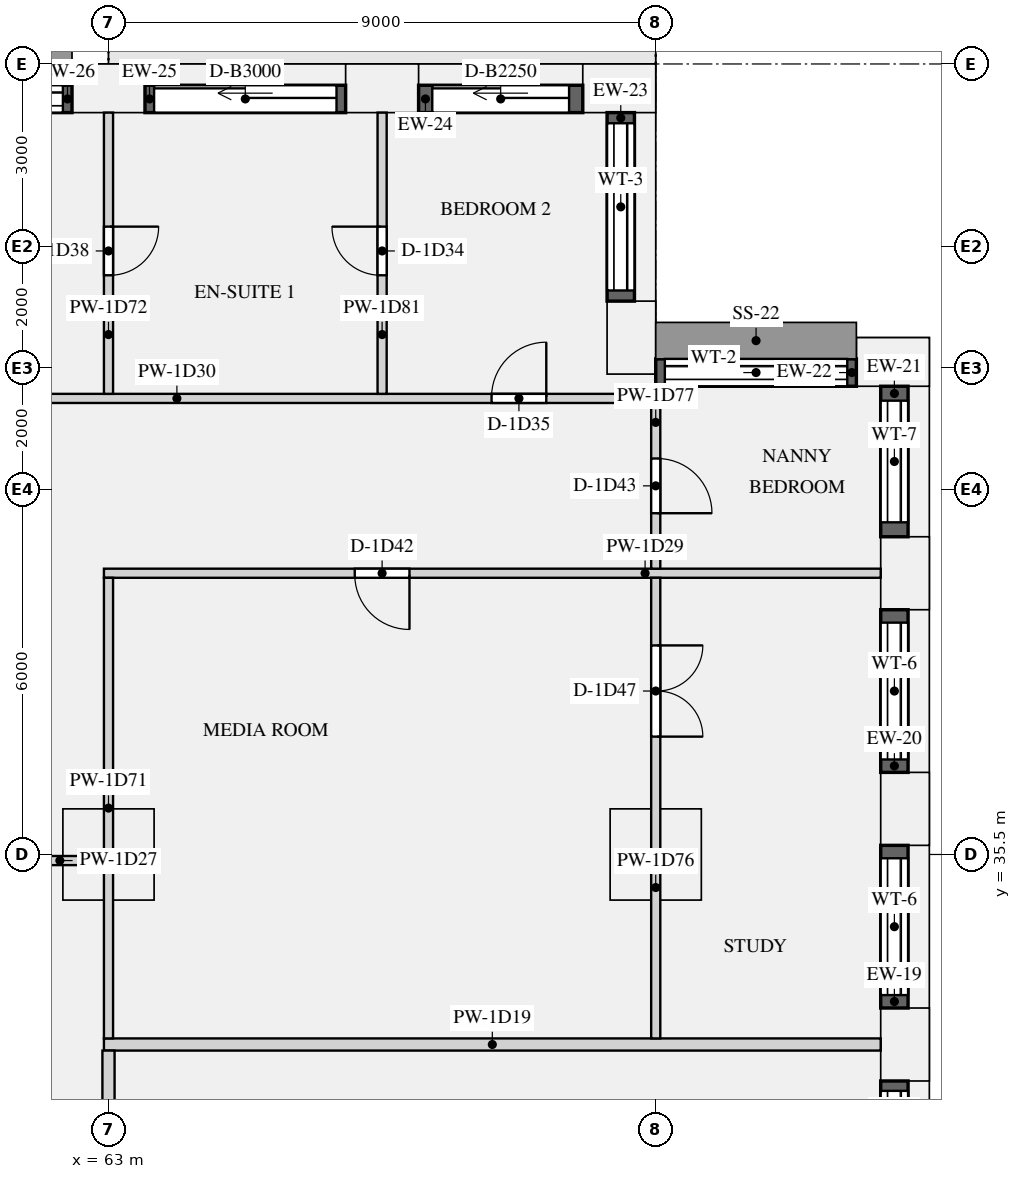
"""IFC4 building model, lengths in metres.
Left out: names, types, materials, properties, quantities, classifications, styles, units other than length and angle.
Written with IfcOpenShell. Run it as: python <this file> out.ifc"""

import sys

from ifc_helpers import new_model, si_unit, direction, frame, frame_2d, origin, origin_2d, place, context, subcontext, project, spatial, rectangle, extrude, element, fill, save


model = new_model("IFC4")
c1 = context("Model", 3, precision=1e-05, world=origin(), true_north=direction((0.0, 1.0)))
c2 = subcontext(c1, "Body", "Model", "MODEL_VIEW")
j1 = project(units=[si_unit("LENGTHUNIT", "METRE"), si_unit("PLANEANGLEUNIT", "RADIAN")], contexts=[c1])
p1 = place(None, origin())
s1 = spatial("IfcSite", under=j1, at=p1, CompositionType="ELEMENT")
p2 = place(p1, origin())
s2 = spatial("IfcBuilding", under=s1, at=p2, CompositionType="ELEMENT")
p3 = place(p2, frame((0.0, 0.0, 47.85)))
s3 = spatial("IfcBuildingStorey", under=s2, at=p3, CompositionType="ELEMENT", Elevation=47.85)
for number, where, z_axis, x_axis in (
    (1, (76.1, 32.375, 0.0), (0.0, 0.0, 1.0), (0.0, 1.0, 0.0)),
    (2, (76.1, 36.25, 0.0), (0.0, 0.0, 1.0), (0.0, 1.0, 0.0)),
    (3, (76.1, 40.125, 0.0), (0.0, 0.0, 1.0), (0.0, 1.0, 0.0)),
    (4, (75.9, 43.6, 0.0), (0.0, 0.0, 1.0), (-1.0, 0.0, 0.0)),
    (5, (71.6, 44.0, 0.0), (0.0, 0.0, 1.0), (0.0, 1.0, 0.0)),
    (6, (71.4, 48.1, 0.0), (0.0, 0.0, 1.0), (-1.0, 0.0, 0.0)),
    (7, (67.5, 48.1, 0.0), (0.0, 0.0, 1.0), (-1.0, 0.0, 0.0)),
    (8, (63.0, 48.1, 0.0), (0.0, 0.0, 1.0), (-1.0, 0.0, 0.0)),
):
    element("IfcColumn", number, at=place(p3, frame(where, z_axis=z_axis, x_axis=x_axis)), inside=s3, PredefinedType="USERDEFINED", context=c2, shape_type="SweptSolid", body=[
        extrude(rectangle(XDim=1.2, YDim=0.8, at=origin_2d()), origin(), (0.0, 0.0, 1.0), 3.15),
    ])
for number, where, z_axis, x_axis in (
    (9, (63.0, 35.5, 0.0), (0.0, 0.0, 1.0), (1.0, 0.0, 0.0)),
    (10, (72.0, 35.5, 0.0), (0.0, 0.0, 1.0), (1.0, 0.0, 0.0)),
):
    element("IfcColumn", number, at=place(p3, frame(where, z_axis=z_axis, x_axis=x_axis)), inside=s3, PredefinedType="COLUMN", context=c2, shape_type="SweptSolid", body=[
        extrude(rectangle(XDim=1.5, YDim=1.5, at=origin_2d()), origin(), (0.0, 0.0, 1.0), 3.15),
    ])
p4 = place(p3, frame((75.925, 29.7, 0.9), z_axis=(0.0, 0.0, 1.0), x_axis=(0.0, 1.0, 0.0)))
e11 = element("IfcWall", 11, at=p4, inside=s3, PredefinedType="SOLIDWALL", context=c2, shape_type="SweptSolid", body=[
    extrude(rectangle(XDim=2.075, YDim=0.45, at=frame_2d((1.038, 0.0))), origin(), (0.0, 0.0, 1.0), 1.93),
])
p5 = place(p4, frame((0.163, 0.0, 0.15)))
e12 = element("IfcOpeningElement", 12, at=p5, cuts=e11, PredefinedType="OPENING", context=c2, shape_type="SweptSolid", body=[
    extrude(rectangle(XDim=1.75, YDim=1.5, at=frame_2d((0.875, 0.75))), frame((0.0, 0.235, 0.0), z_axis=(0.0, -1.0, 0.0), x_axis=(1.0, 0.0, 0.0)), (0.0, 0.0, 1.0), 0.47),
])
p6 = place(p3, frame((75.925, 32.975, 0.9), z_axis=(0.0, 0.0, 1.0), x_axis=(0.0, 1.0, 0.0)))
e13 = element("IfcWall", 13, at=p6, inside=s3, PredefinedType="SOLIDWALL", context=c2, shape_type="SweptSolid", body=[
    extrude(rectangle(XDim=2.675, YDim=0.45, at=frame_2d((1.337, 0.0))), origin(), (0.0, 0.0, 1.0), 1.93),
])
p7 = place(p6, frame((0.212, 0.0, 0.15)))
e14 = element("IfcOpeningElement", 14, at=p7, cuts=e13, PredefinedType="OPENING", context=c2, shape_type="SweptSolid", body=[
    extrude(rectangle(XDim=2.25, YDim=1.5, at=frame_2d((1.125, 0.75))), frame((0.0, 0.235, 0.0), z_axis=(0.0, -1.0, 0.0), x_axis=(1.0, 0.0, 0.0)), (0.0, 0.0, 1.0), 0.47),
])
p8 = place(p3, frame((75.925, 36.85, 0.9), z_axis=(0.0, 0.0, 1.0), x_axis=(0.0, 1.0, 0.0)))
e15 = element("IfcWall", 15, at=p8, inside=s3, PredefinedType="SOLIDWALL", context=c2, shape_type="SweptSolid", body=[
    extrude(rectangle(XDim=2.675, YDim=0.45, at=frame_2d((1.337, 0.0))), origin(), (0.0, 0.0, 1.0), 1.93),
])
p9 = place(p8, frame((0.212, 0.0, 0.15)))
e16 = element("IfcOpeningElement", 16, at=p9, cuts=e15, PredefinedType="OPENING", context=c2, shape_type="SweptSolid", body=[
    extrude(rectangle(XDim=2.25, YDim=1.5, at=frame_2d((1.125, 0.75))), frame((0.0, 0.235, 0.0), z_axis=(0.0, -1.0, 0.0), x_axis=(1.0, 0.0, 0.0)), (0.0, 0.0, 1.0), 0.47),
])
p10 = place(p3, frame((75.925, 40.725, 0.9), z_axis=(0.0, 0.0, 1.0), x_axis=(0.0, 1.0, 0.0)))
e17 = element("IfcWall", 17, at=p10, inside=s3, PredefinedType="SOLIDWALL", context=c2, shape_type="SweptSolid", body=[
    extrude(rectangle(XDim=2.475, YDim=0.45, at=frame_2d((1.237, 0.0))), origin(), (0.0, 0.0, 1.0), 1.93),
])
p11 = place(p10, frame((0.238, 0.0, 0.15)))
e18 = element("IfcOpeningElement", 18, at=p11, cuts=e17, PredefinedType="OPENING", context=c2, shape_type="SweptSolid", body=[
    extrude(rectangle(XDim=2.0, YDim=1.5, at=frame_2d((1.0, 0.75))), frame((0.0, 0.235, 0.0), z_axis=(0.0, -1.0, 0.0), x_axis=(1.0, 0.0, 0.0)), (0.0, 0.0, 1.0), 0.47),
])
p12 = place(p3, frame((75.3, 43.425, 0.9), z_axis=(0.0, 0.0, 1.0), x_axis=(-1.0, 0.0, 0.0)))
e19 = element("IfcWall", 19, at=p12, inside=s3, PredefinedType="SOLIDWALL", context=c2, shape_type="SweptSolid", body=[
    extrude(rectangle(XDim=3.3, YDim=0.45, at=frame_2d((1.65, 0.0))), origin(), (0.0, 0.0, 1.0), 1.93),
])
p13 = place(p12, frame((0.15, 0.0, 0.15)))
e20 = element("IfcOpeningElement", 20, at=p13, cuts=e19, PredefinedType="OPENING", context=c2, shape_type="SweptSolid", body=[
    extrude(rectangle(XDim=3.0, YDim=1.5, at=frame_2d((1.5, 0.75))), frame((0.0, 0.235, 0.0), z_axis=(0.0, -1.0, 0.0), x_axis=(1.0, 0.0, 0.0)), (0.0, 0.0, 1.0), 0.47),
])
p14 = place(p3, frame((71.425, 44.6, 0.9), z_axis=(0.0, 0.0, 1.0), x_axis=(0.0, 1.0, 0.0)))
e21 = element("IfcWall", 21, at=p14, inside=s3, PredefinedType="SOLIDWALL", context=c2, shape_type="SweptSolid", body=[
    extrude(rectangle(XDim=3.1, YDim=0.45, at=frame_2d((1.55, 0.0))), origin(), (0.0, 0.0, 1.0), 1.93),
])
p15 = place(p14, frame((0.175, 0.0, 0.15)))
e22 = element("IfcOpeningElement", 22, at=p15, cuts=e21, PredefinedType="OPENING", context=c2, shape_type="SweptSolid", body=[
    extrude(rectangle(XDim=2.75, YDim=1.5, at=frame_2d((1.375, 0.75))), frame((0.0, 0.235, 0.0), z_axis=(0.0, -1.0, 0.0), x_axis=(1.0, 0.0, 0.0)), (0.0, 0.0, 1.0), 0.47),
])
p16 = place(p3, frame((70.8, 47.925, 0.0), z_axis=(0.0, 0.0, 1.0), x_axis=(-1.0, 0.0, 0.0)))
e23 = element("IfcWall", 23, at=p16, inside=s3, PredefinedType="SOLIDWALL", context=c2, shape_type="SweptSolid", body=[
    extrude(rectangle(XDim=2.7, YDim=0.45, at=frame_2d((1.35, 0.0))), origin(), (0.0, 0.0, 1.0), 2.83),
])
p17 = place(p16, frame((0.225, 0.0, 0.0)))
e24 = element("IfcOpeningElement", 24, at=p17, cuts=e23, PredefinedType="OPENING", context=c2, shape_type="SweptSolid", body=[
    extrude(rectangle(XDim=2.25, YDim=2.3, at=frame_2d((1.125, 1.15))), frame((0.0, 0.235, 0.0), z_axis=(0.0, -1.0, 0.0), x_axis=(1.0, 0.0, 0.0)), (0.0, 0.0, 1.0), 0.47),
])
p18 = place(p3, frame((66.9, 47.925, 0.0), z_axis=(0.0, 0.0, 1.0), x_axis=(-1.0, 0.0, 0.0)))
e25 = element("IfcWall", 25, at=p18, inside=s3, PredefinedType="SOLIDWALL", context=c2, shape_type="SweptSolid", body=[
    extrude(rectangle(XDim=3.3, YDim=0.45, at=frame_2d((1.65, 0.0))), origin(), (0.0, 0.0, 1.0), 2.83),
])
p19 = place(p18, frame((0.15, 0.0, 0.0)))
e26 = element("IfcOpeningElement", 26, at=p19, cuts=e25, PredefinedType="OPENING", context=c2, shape_type="SweptSolid", body=[
    extrude(rectangle(XDim=3.0, YDim=2.3, at=frame_2d((1.5, 1.15))), frame((0.0, 0.235, 0.0), z_axis=(0.0, -1.0, 0.0), x_axis=(1.0, 0.0, 0.0)), (0.0, 0.0, 1.0), 0.47),
])
p20 = place(p3, frame((62.4, 47.925, 0.9), z_axis=(0.0, 0.0, 1.0), x_axis=(-1.0, 0.0, 0.0)))
e27 = element("IfcWall", 27, at=p20, inside=s3, PredefinedType="SOLIDWALL", context=c2, shape_type="SweptSolid", body=[
    extrude(rectangle(XDim=3.3, YDim=0.45, at=frame_2d((1.65, 0.0))), origin(), (0.0, 0.0, 1.0), 1.93),
])
p21 = place(p20, frame((0.15, 0.0, 0.15)))
e28 = element("IfcOpeningElement", 28, at=p21, cuts=e27, PredefinedType="OPENING", context=c2, shape_type="SweptSolid", body=[
    extrude(rectangle(XDim=3.0, YDim=1.5, at=frame_2d((1.5, 0.75))), frame((0.0, 0.235, 0.0), z_axis=(0.0, -1.0, 0.0), x_axis=(1.0, 0.0, 0.0)), (0.0, 0.0, 1.0), 0.47),
])
p22 = place(p3, frame((62.925, 32.375, 0.0), z_axis=(0.0, 0.0, 1.0), x_axis=(1.0, 0.0, 0.0)))
e29 = element("IfcWall", 29, at=p22, inside=s3, PredefinedType="PARTITIONING", context=c2, shape_type="SweptSolid", body=[
    extrude(rectangle(XDim=12.775, YDim=0.2, at=frame_2d((6.387, 0.0))), origin(), (0.0, 0.0, 1.0), 2.83),
])
p23 = place(p3, frame((59.8, 35.4, 0.0), z_axis=(0.0, 0.0, 1.0), x_axis=(1.0, 0.0, 0.0)))
e30 = element("IfcWall", 30, at=p23, inside=s3, PredefinedType="PARTITIONING", context=c2, shape_type="SweptSolid", body=[
    extrude(rectangle(XDim=3.125, YDim=0.15, at=frame_2d((1.562, 0.0))), origin(), (0.0, 0.0, 1.0), 2.83),
])
p24 = place(p23, frame((0.775, 0.0, 0.0)))
e31 = element("IfcOpeningElement", 31, at=p24, cuts=e30, PredefinedType="OPENING", context=c2, shape_type="SweptSolid", body=[
    extrude(rectangle(XDim=0.9, YDim=2.1, at=frame_2d((0.45, 1.05))), frame((0.0, 0.085, 0.0), z_axis=(0.0, -1.0, 0.0), x_axis=(1.0, 0.0, 0.0)), (0.0, 0.0, 1.0), 0.17),
])
p25 = place(p3, frame((62.925, 40.125, 0.0), z_axis=(0.0, 0.0, 1.0), x_axis=(1.0, 0.0, 0.0)))
e32 = element("IfcWall", 32, at=p25, inside=s3, PredefinedType="PARTITIONING", context=c2, shape_type="SweptSolid", body=[
    extrude(rectangle(XDim=12.775, YDim=0.15, at=frame_2d((6.387, 0.0))), origin(), (0.0, 0.0, 1.0), 2.83),
])
p26 = place(p25, frame((4.125, 0.0, 0.0)))
e33 = element("IfcOpeningElement", 33, at=p26, cuts=e32, PredefinedType="OPENING", context=c2, shape_type="SweptSolid", body=[
    extrude(rectangle(XDim=0.9, YDim=2.1, at=frame_2d((0.45, 1.05))), frame((0.0, 0.085, 0.0), z_axis=(0.0, -1.0, 0.0), x_axis=(1.0, 0.0, 0.0)), (0.0, 0.0, 1.0), 0.17),
])
p27 = place(p3, frame((53.925, 43.0, 0.0), z_axis=(0.0, 0.0, 1.0), x_axis=(1.0, 0.0, 0.0)))
e34 = element("IfcWall", 34, at=p27, inside=s3, PredefinedType="PARTITIONING", context=c2, shape_type="SweptSolid", body=[
    extrude(rectangle(XDim=18.0, YDim=0.15, at=frame_2d((9.0, 0.0))), origin(), (0.0, 0.0, 1.0), 2.83),
])
p28 = place(p27, frame((15.375, 0.0, 0.0)))
e35 = element("IfcOpeningElement", 35, at=p28, cuts=e34, PredefinedType="OPENING", context=c2, shape_type="SweptSolid", body=[
    extrude(rectangle(XDim=0.9, YDim=2.1, at=frame_2d((0.45, 1.05))), frame((0.0, 0.085, 0.0), z_axis=(0.0, -1.0, 0.0), x_axis=(1.0, 0.0, 0.0)), (0.0, 0.0, 1.0), 0.17),
])
p29 = place(p27, frame((4.125, 0.0, 0.0)))
e36 = element("IfcOpeningElement", 36, at=p29, cuts=e34, PredefinedType="OPENING", context=c2, shape_type="SweptSolid", body=[
    extrude(rectangle(XDim=0.9, YDim=2.1, at=frame_2d((0.45, 1.05))), frame((0.0, 0.085, 0.0), z_axis=(0.0, -1.0, 0.0), x_axis=(1.0, 0.0, 0.0)), (0.0, 0.0, 1.0), 0.17),
])
p30 = place(p3, frame((63.0, 32.475, 0.0), z_axis=(0.0, 0.0, 1.0), x_axis=(0.0, 1.0, 0.0)))
e37 = element("IfcWall", 37, at=p30, inside=s3, PredefinedType="PARTITIONING", context=c2, shape_type="SweptSolid", body=[
    extrude(rectangle(XDim=7.575, YDim=0.15, at=frame_2d((3.788, 0.0))), origin(), (0.0, 0.0, 1.0), 2.83),
])
p31 = place(p3, frame((63.0, 43.075, 0.0), z_axis=(0.0, 0.0, 1.0), x_axis=(0.0, 1.0, 0.0)))
e38 = element("IfcWall", 38, at=p31, inside=s3, PredefinedType="PARTITIONING", context=c2, shape_type="SweptSolid", body=[
    extrude(rectangle(XDim=4.625, YDim=0.15, at=frame_2d((2.312, 0.0))), origin(), (0.0, 0.0, 1.0), 2.83),
])
p32 = place(p31, frame((1.95, 0.0, 0.0)))
e39 = element("IfcOpeningElement", 39, at=p32, cuts=e38, PredefinedType="OPENING", context=c2, shape_type="SweptSolid", body=[
    extrude(rectangle(XDim=0.8, YDim=2.1, at=frame_2d((0.4, 1.05))), frame((0.0, 0.085, 0.0), z_axis=(0.0, -1.0, 0.0), x_axis=(1.0, 0.0, 0.0)), (0.0, 0.0, 1.0), 0.17),
])
p33 = place(p3, frame((63.0, 28.575, 0.0), z_axis=(0.0, 0.0, 1.0), x_axis=(0.0, 1.0, 0.0)))
e40 = element("IfcWall", 40, at=p33, inside=s3, PredefinedType="PARTITIONING", context=c2, shape_type="SweptSolid", body=[
    extrude(rectangle(XDim=3.7, YDim=0.2, at=frame_2d((1.85, 0.0))), origin(), (0.0, 0.0, 1.0), 2.83),
])
p34 = place(p3, frame((72.0, 32.475, 0.0), z_axis=(0.0, 0.0, 1.0), x_axis=(0.0, 1.0, 0.0)))
e41 = element("IfcWall", 41, at=p34, inside=s3, PredefinedType="PARTITIONING", context=c2, shape_type="SweptSolid", body=[
    extrude(rectangle(XDim=7.575, YDim=0.15, at=frame_2d((3.788, 0.0))), origin(), (0.0, 0.0, 1.0), 2.83),
])
p35 = place(p34, frame((4.963, 0.0, 0.0)))
e42 = element("IfcOpeningElement", 42, at=p35, cuts=e41, PredefinedType="OPENING", context=c2, shape_type="SweptSolid", body=[
    extrude(rectangle(XDim=1.5, YDim=2.1, at=frame_2d((0.75, 1.05))), frame((0.0, 0.085, 0.0), z_axis=(0.0, -1.0, 0.0), x_axis=(1.0, 0.0, 0.0)), (0.0, 0.0, 1.0), 0.17),
])
p36 = place(p3, frame((72.0, 40.2, 0.0), z_axis=(0.0, 0.0, 1.0), x_axis=(0.0, 1.0, 0.0)))
e43 = element("IfcWall", 43, at=p36, inside=s3, PredefinedType="PARTITIONING", context=c2, shape_type="SweptSolid", body=[
    extrude(rectangle(XDim=3.0, YDim=0.15, at=frame_2d((1.5, 0.0))), origin(), (0.0, 0.0, 1.0), 2.83),
])
p37 = place(p36, frame((0.912, 0.0, 0.0)))
e44 = element("IfcOpeningElement", 44, at=p37, cuts=e43, PredefinedType="OPENING", context=c2, shape_type="SweptSolid", body=[
    extrude(rectangle(XDim=0.9, YDim=2.1, at=frame_2d((0.45, 1.05))), frame((0.0, 0.085, 0.0), z_axis=(0.0, -1.0, 0.0), x_axis=(1.0, 0.0, 0.0)), (0.0, 0.0, 1.0), 0.17),
])
p38 = place(p3, frame((67.5, 43.075, 0.0), z_axis=(0.0, 0.0, 1.0), x_axis=(0.0, 1.0, 0.0)))
e45 = element("IfcWall", 45, at=p38, inside=s3, PredefinedType="PARTITIONING", context=c2, shape_type="SweptSolid", body=[
    extrude(rectangle(XDim=4.625, YDim=0.15, at=frame_2d((2.312, 0.0))), origin(), (0.0, 0.0, 1.0), 2.83),
])
p39 = place(p38, frame((1.95, 0.0, 0.0)))
e46 = element("IfcOpeningElement", 46, at=p39, cuts=e45, PredefinedType="OPENING", context=c2, shape_type="SweptSolid", body=[
    extrude(rectangle(XDim=0.8, YDim=2.1, at=frame_2d((0.4, 1.05))), frame((0.0, 0.085, 0.0), z_axis=(0.0, -1.0, 0.0), x_axis=(1.0, 0.0, 0.0)), (0.0, 0.0, 1.0), 0.17),
])
p40 = place(p5, origin())
e47 = element("IfcWindow", 47, at=p40, inside=s3, PartitioningType="SINGLE_PANEL", PredefinedType="WINDOW", context=c2, shape_type="SweptSolid", body=[
    extrude(rectangle(XDim=1.75, YDim=1.5, at=frame_2d((0.875, 0.75))), frame((0.0, -0.065, 0.0), z_axis=(0.0, -1.0, 0.0), x_axis=(1.0, 0.0, 0.0)), (0.0, 0.0, 1.0), 0.06),
])
fill(e12, e47)
p41 = place(p7, origin())
e48 = element("IfcWindow", 48, at=p41, inside=s3, PartitioningType="SINGLE_PANEL", PredefinedType="WINDOW", context=c2, shape_type="SweptSolid", body=[
    extrude(rectangle(XDim=2.25, YDim=1.5, at=frame_2d((1.125, 0.75))), frame((0.0, -0.065, 0.0), z_axis=(0.0, -1.0, 0.0), x_axis=(1.0, 0.0, 0.0)), (0.0, 0.0, 1.0), 0.06),
])
fill(e14, e48)
p42 = place(p9, origin())
e49 = element("IfcWindow", 49, at=p42, inside=s3, PartitioningType="SINGLE_PANEL", PredefinedType="WINDOW", context=c2, shape_type="SweptSolid", body=[
    extrude(rectangle(XDim=2.25, YDim=1.5, at=frame_2d((1.125, 0.75))), frame((0.0, -0.065, 0.0), z_axis=(0.0, -1.0, 0.0), x_axis=(1.0, 0.0, 0.0)), (0.0, 0.0, 1.0), 0.06),
])
fill(e16, e49)
p43 = place(p11, origin())
e50 = element("IfcWindow", 50, at=p43, inside=s3, PartitioningType="SINGLE_PANEL", PredefinedType="WINDOW", context=c2, shape_type="SweptSolid", body=[
    extrude(rectangle(XDim=2.0, YDim=1.5, at=frame_2d((1.0, 0.75))), frame((0.0, -0.065, 0.0), z_axis=(0.0, -1.0, 0.0), x_axis=(1.0, 0.0, 0.0)), (0.0, 0.0, 1.0), 0.06),
])
fill(e18, e50)
p44 = place(p13, origin())
e51 = element("IfcWindow", 51, at=p44, inside=s3, PartitioningType="SINGLE_PANEL", PredefinedType="WINDOW", context=c2, shape_type="SweptSolid", body=[
    extrude(rectangle(XDim=3.0, YDim=1.5, at=frame_2d((1.5, 0.75))), frame((0.0, -0.065, 0.0), z_axis=(0.0, -1.0, 0.0), x_axis=(1.0, 0.0, 0.0)), (0.0, 0.0, 1.0), 0.06),
])
fill(e20, e51)
p45 = place(p15, origin())
e52 = element("IfcWindow", 52, at=p45, inside=s3, PartitioningType="SINGLE_PANEL", PredefinedType="WINDOW", context=c2, shape_type="SweptSolid", body=[
    extrude(rectangle(XDim=2.75, YDim=1.5, at=frame_2d((1.375, 0.75))), frame((0.0, -0.065, 0.0), z_axis=(0.0, -1.0, 0.0), x_axis=(1.0, 0.0, 0.0)), (0.0, 0.0, 1.0), 0.06),
])
fill(e22, e52)
p46 = place(p17, origin())
e53 = element("IfcDoor", 53, at=p46, inside=s3, OperationType="SLIDING_TO_LEFT", PredefinedType="DOOR", context=c2, shape_type="SweptSolid", body=[
    extrude(rectangle(XDim=2.25, YDim=2.3, at=frame_2d((1.125, 1.15))), frame((0.0, -0.07, 0.0), z_axis=(0.0, -1.0, 0.0), x_axis=(1.0, 0.0, 0.0)), (0.0, 0.0, 1.0), 0.05),
])
fill(e24, e53)
p47 = place(p19, origin())
e54 = element("IfcDoor", 54, at=p47, inside=s3, OperationType="SLIDING_TO_LEFT", PredefinedType="DOOR", context=c2, shape_type="SweptSolid", body=[
    extrude(rectangle(XDim=3.0, YDim=2.3, at=frame_2d((1.5, 1.15))), frame((0.0, -0.07, 0.0), z_axis=(0.0, -1.0, 0.0), x_axis=(1.0, 0.0, 0.0)), (0.0, 0.0, 1.0), 0.05),
])
fill(e26, e54)
p48 = place(p21, origin())
e55 = element("IfcWindow", 55, at=p48, inside=s3, PartitioningType="SINGLE_PANEL", PredefinedType="WINDOW", context=c2, shape_type="SweptSolid", body=[
    extrude(rectangle(XDim=3.0, YDim=1.5, at=frame_2d((1.5, 0.75))), frame((0.0, -0.065, 0.0), z_axis=(0.0, -1.0, 0.0), x_axis=(1.0, 0.0, 0.0)), (0.0, 0.0, 1.0), 0.06),
])
fill(e28, e55)
p49 = place(p39, origin())
e56 = element("IfcDoor", 56, at=p49, inside=s3, OperationType="SINGLE_SWING_RIGHT", PredefinedType="DOOR", context=c2, shape_type="SweptSolid", body=[
    extrude(rectangle(XDim=0.8, YDim=2.1, at=frame_2d((0.4, 1.05))), frame((0.0, 0.025, 0.0), z_axis=(0.0, -1.0, 0.0), x_axis=(1.0, 0.0, 0.0)), (0.0, 0.0, 1.0), 0.05),
])
fill(e46, e56)
p50 = place(p28, origin())
e57 = element("IfcDoor", 57, at=p50, inside=s3, OperationType="SINGLE_SWING_RIGHT", PredefinedType="DOOR", context=c2, shape_type="SweptSolid", body=[
    extrude(rectangle(XDim=0.9, YDim=2.1, at=frame_2d((0.45, 1.05))), frame((0.0, 0.025, 0.0), z_axis=(0.0, -1.0, 0.0), x_axis=(1.0, 0.0, 0.0)), (0.0, 0.0, 1.0), 0.05),
])
fill(e35, e57)
p51 = place(p32, frame((0.8, 0.0, 0.0), z_axis=(0.0, 0.0, 1.0), x_axis=(-1.0, 0.0, 0.0)))
e58 = element("IfcDoor", 58, at=p51, inside=s3, OperationType="SINGLE_SWING_LEFT", PredefinedType="DOOR", context=c2, shape_type="SweptSolid", body=[
    extrude(rectangle(XDim=0.8, YDim=2.1, at=frame_2d((0.4, 1.05))), frame((0.0, 0.025, 0.0), z_axis=(0.0, -1.0, 0.0), x_axis=(1.0, 0.0, 0.0)), (0.0, 0.0, 1.0), 0.05),
])
fill(e39, e58)
p52 = place(p26, frame((0.9, 0.0, 0.0), z_axis=(0.0, 0.0, 1.0), x_axis=(-1.0, 0.0, 0.0)))
e59 = element("IfcDoor", 59, at=p52, inside=s3, OperationType="SINGLE_SWING_LEFT", PredefinedType="DOOR", context=c2, shape_type="SweptSolid", body=[
    extrude(rectangle(XDim=0.9, YDim=2.1, at=frame_2d((0.45, 1.05))), frame((0.0, 0.025, 0.0), z_axis=(0.0, -1.0, 0.0), x_axis=(1.0, 0.0, 0.0)), (0.0, 0.0, 1.0), 0.05),
])
fill(e33, e59)
p53 = place(p37, frame((0.9, 0.0, 0.0), z_axis=(0.0, 0.0, 1.0), x_axis=(-1.0, 0.0, 0.0)))
e60 = element("IfcDoor", 60, at=p53, inside=s3, OperationType="SINGLE_SWING_RIGHT", PredefinedType="DOOR", context=c2, shape_type="SweptSolid", body=[
    extrude(rectangle(XDim=0.9, YDim=2.1, at=frame_2d((0.45, 1.05))), frame((0.0, 0.025, 0.0), z_axis=(0.0, -1.0, 0.0), x_axis=(1.0, 0.0, 0.0)), (0.0, 0.0, 1.0), 0.05),
])
fill(e44, e60)
p54 = place(p35, frame((1.5, 0.0, 0.0), z_axis=(0.0, 0.0, 1.0), x_axis=(-1.0, 0.0, 0.0)))
e61 = element("IfcDoor", 61, at=p54, inside=s3, OperationType="DOUBLE_DOOR_SINGLE_SWING", PredefinedType="DOOR", context=c2, shape_type="SweptSolid", body=[
    extrude(rectangle(XDim=1.5, YDim=2.1, at=frame_2d((0.75, 1.05))), frame((0.0, 0.025, 0.0), z_axis=(0.0, -1.0, 0.0), x_axis=(1.0, 0.0, 0.0)), (0.0, 0.0, 1.0), 0.05),
])
fill(e42, e61)
save(model, sys.argv[1])
